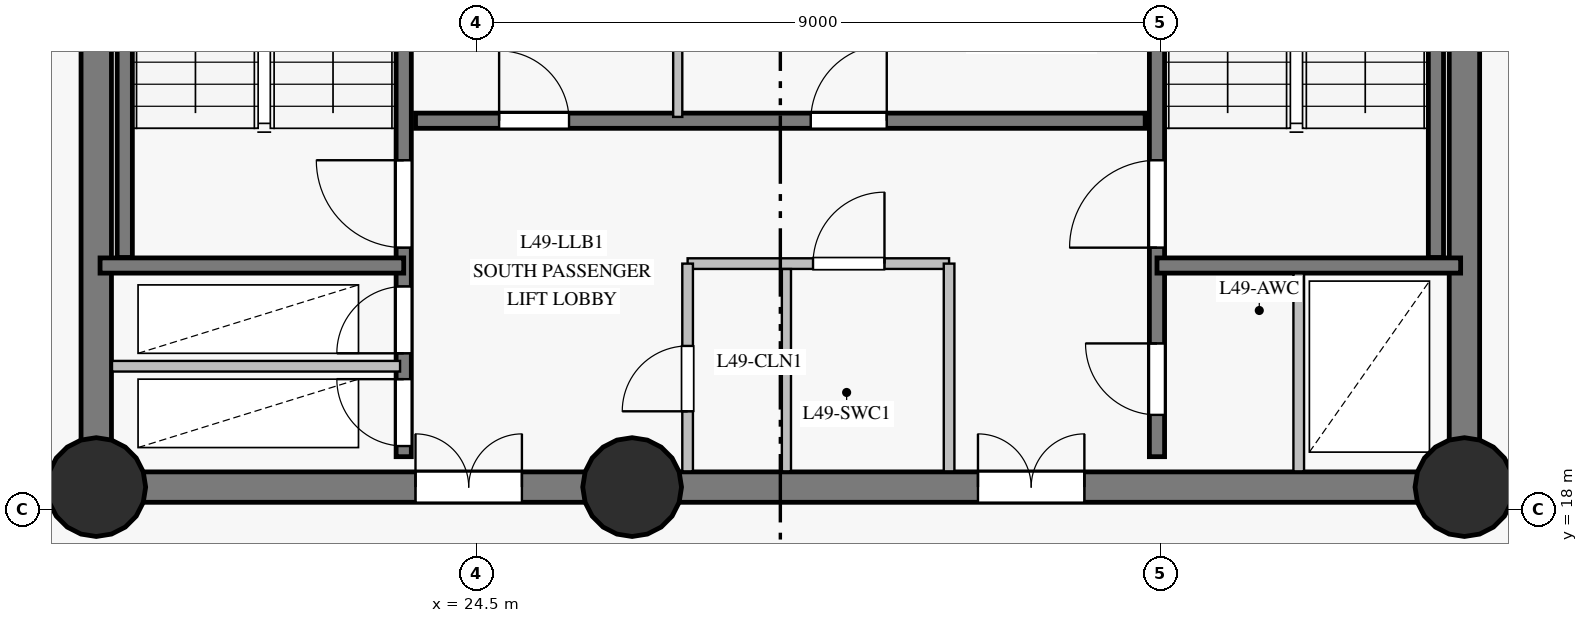
"""IFC4 building model, lengths in metres.
Left out: names, types, materials, properties, quantities, classifications, styles, units other than length and angle.
Written with IfcOpenShell. Run it as: python <this file> out.ifc"""

import sys

from ifc_helpers import new_model, si_unit, direction, frame, frame_2d, origin, origin_with_axes, origin_2d, place, context, subcontext, project, spatial, rectangle, circle, extrude, source, transform, mapped, element, fill, save


model = new_model("IFC4")
c1 = context("Model", 3, precision=1e-05, world=origin(), true_north=direction((0.0, 1.0)))
c2 = subcontext(c1, "Body", "Model", "MODEL_VIEW")
j1 = project(units=[si_unit("LENGTHUNIT", "METRE"), si_unit("PLANEANGLEUNIT", "RADIAN")], contexts=[c1])
p1 = place(None, origin())
s1 = spatial("IfcSite", under=j1, at=p1, CompositionType="ELEMENT")
p2 = place(p1, origin())
s2 = spatial("IfcBuilding", under=s1, at=p2, CompositionType="ELEMENT")
p3 = place(p2, frame((0.0, 0.0, 171.8)))
s3 = spatial("IfcBuildingStorey", under=s2, at=p3, CompositionType="ELEMENT", Elevation=171.8)
p4 = place(p3, frame((19.5, 18.3, 0.0), z_axis=(0.0, 0.0, 1.0), x_axis=(1.0, 0.0, 0.0)))
e1 = element("IfcWall", 1, at=p4, inside=s3, PredefinedType="SHEAR", context=c2, shape_type="SweptSolid", body=[
    extrude(rectangle(XDim=7.05, YDim=0.4, at=frame_2d((3.525, 0.0))), origin(), (0.0, 0.0, 1.0), 2.825),
])
p5 = place(p4, frame((4.2, 0.0, 0.0)))
e2 = element("IfcOpeningElement", 2, at=p5, cuts=e1, PredefinedType="OPENING", context=c2, shape_type="SweptSolid", body=[
    extrude(rectangle(XDim=1.4, YDim=2.2, at=frame_2d((0.7, 1.1))), frame((0.0, 0.21, 0.0), z_axis=(0.0, -1.0, 0.0), x_axis=(1.0, 0.0, 0.0)), (0.0, 0.0, 1.0), 0.42),
])
p6 = place(p3, frame((26.55, 18.3, 0.0), z_axis=(0.0, 0.0, 1.0), x_axis=(1.0, 0.0, 0.0)))
e3 = element("IfcWall", 3, at=p6, inside=s3, PredefinedType="SHEAR", context=c2, shape_type="SweptSolid", body=[
    extrude(rectangle(XDim=10.95, YDim=0.4, at=frame_2d((5.475, 0.0))), origin(), (0.0, 0.0, 1.0), 2.825),
])
p7 = place(p6, frame((4.55, 0.0, 0.0)))
e4 = element("IfcOpeningElement", 4, at=p7, cuts=e3, PredefinedType="OPENING", context=c2, shape_type="SweptSolid", body=[
    extrude(rectangle(XDim=1.4, YDim=2.2, at=frame_2d((0.7, 1.1))), frame((0.0, 0.21, 0.0), z_axis=(0.0, -1.0, 0.0), x_axis=(1.0, 0.0, 0.0)), (0.0, 0.0, 1.0), 0.42),
])
p8 = place(p3, frame((37.5, 18.3, 0.0), z_axis=(0.0, 0.0, 1.0), x_axis=(0.0, 1.0, 0.0)))
e5 = element("IfcWall", 5, at=p8, inside=s3, PredefinedType="SHEAR", context=c2, shape_type="SweptSolid", body=[
    extrude(rectangle(XDim=16.4, YDim=0.4, at=frame_2d((8.2, 0.0))), origin(), (0.0, 0.0, 1.0), 2.825),
])
p9 = place(p8, frame((14.15, 0.0, 0.0)))
e6 = element("IfcOpeningElement", 6, at=p9, cuts=e5, PredefinedType="OPENING", context=c2, shape_type="SweptSolid", body=[
    extrude(rectangle(XDim=1.2, YDim=2.15, at=frame_2d((0.6, 1.075))), frame((0.0, 0.21, 0.0), z_axis=(0.0, -1.0, 0.0), x_axis=(1.0, 0.0, 0.0)), (0.0, 0.0, 1.0), 0.42),
])
p10 = place(p3, frame((19.5, 34.7, 0.0), z_axis=(0.0, 0.0, 1.0), x_axis=(0.0, -1.0, 0.0)))
e7 = element("IfcWall", 7, at=p10, inside=s3, PredefinedType="SHEAR", context=c2, shape_type="SweptSolid", body=[
    extrude(rectangle(XDim=16.4, YDim=0.4, at=frame_2d((8.2, 0.0))), origin(), (0.0, 0.0, 1.0), 2.825),
])
p11 = place(p10, frame((3.1, 0.0, 0.0)))
e8 = element("IfcOpeningElement", 8, at=p11, cuts=e7, PredefinedType="OPENING", context=c2, shape_type="SweptSolid", body=[
    extrude(rectangle(XDim=1.1, YDim=2.15, at=frame_2d((0.55, 1.075))), frame((0.0, 0.21, 0.0), z_axis=(0.0, -1.0, 0.0), x_axis=(1.0, 0.0, 0.0)), (0.0, 0.0, 1.0), 0.42),
])
m1 = source(origin_with_axes(), c2, "Body", "SweptSolid", [
    extrude(circle(Radius=0.65, at=origin_2d()), origin(), (0.0, 0.0, 1.0), 3.05),
])
for number, where, z_axis, x_axis in (
    (9, (19.5, 18.3, 0.0), (0.0, 0.0, 1.0), (1.0, 0.0, 0.0)),
    (10, (26.55, 18.3, 0.0), (0.0, 0.0, 1.0), (1.0, 0.0, 0.0)),
    (11, (37.5, 18.3, 0.0), (0.0, 0.0, 1.0), (1.0, 0.0, 0.0)),
):
    element("IfcColumn", number, at=place(p3, frame(where, z_axis=z_axis, x_axis=x_axis)), inside=s3, PredefinedType="COLUMN", context=c2, shape_type="MappedRepresentation", body=[
        mapped(m1, transform((0.0, 0.0, 0.0), scale=1.0)),
    ])
p12 = place(p3, frame((23.545, 18.7, 0.0), z_axis=(0.0, 0.0, 1.0), x_axis=(0.0, 1.0, 0.0)))
e12 = element("IfcWall", 12, at=p12, inside=s3, PredefinedType="SHEAR", context=c2, shape_type="SweptSolid", body=[
    extrude(rectangle(XDim=15.6, YDim=0.2, at=frame_2d((7.8, 0.0))), origin(), (0.0, 0.0, 1.0), 2.825),
])
p13 = place(p12, frame((2.75, 0.0, 0.0)))
e13 = element("IfcOpeningElement", 13, at=p13, cuts=e12, PredefinedType="OPENING", context=c2, shape_type="SweptSolid", body=[
    extrude(rectangle(XDim=1.15, YDim=2.15, at=frame_2d((0.575, 1.075))), frame((0.0, 0.11, 0.0), z_axis=(0.0, -1.0, 0.0), x_axis=(1.0, 0.0, 0.0)), (0.0, 0.0, 1.0), 0.22),
])
p14 = place(p12, frame((0.14, 0.0, 0.0)))
e14 = element("IfcOpeningElement", 14, at=p14, cuts=e12, PredefinedType="OPENING", context=c2, shape_type="SweptSolid", body=[
    extrude(rectangle(XDim=0.88, YDim=2.1, at=frame_2d((0.44, 1.05))), frame((0.0, 0.11, 0.0), z_axis=(0.0, -1.0, 0.0), x_axis=(1.0, 0.0, 0.0)), (0.0, 0.0, 1.0), 0.22),
])
p15 = place(p12, frame((1.36, 0.0, 0.0)))
e15 = element("IfcOpeningElement", 15, at=p15, cuts=e12, PredefinedType="OPENING", context=c2, shape_type="SweptSolid", body=[
    extrude(rectangle(XDim=0.88, YDim=2.1, at=frame_2d((0.44, 1.05))), frame((0.0, 0.11, 0.0), z_axis=(0.0, -1.0, 0.0), x_axis=(1.0, 0.0, 0.0)), (0.0, 0.0, 1.0), 0.22),
])
p16 = place(p12, frame((12.1, 0.0, 0.0)))
e16 = element("IfcOpeningElement", 16, at=p16, cuts=e12, PredefinedType="OPENING", context=c2, shape_type="SweptSolid", body=[
    extrude(rectangle(XDim=1.12, YDim=2.15, at=frame_2d((0.56, 1.075))), frame((0.0, 0.11, 0.0), z_axis=(0.0, -1.0, 0.0), x_axis=(1.0, 0.0, 0.0)), (0.0, 0.0, 1.0), 0.22),
])
p17 = place(p12, frame((14.05, 0.0, 0.0)))
e17 = element("IfcOpeningElement", 17, at=p17, cuts=e12, PredefinedType="OPENING", context=c2, shape_type="SweptSolid", body=[
    extrude(rectangle(XDim=1.12, YDim=2.15, at=frame_2d((0.56, 1.075))), frame((0.0, 0.11, 0.0), z_axis=(0.0, -1.0, 0.0), x_axis=(1.0, 0.0, 0.0)), (0.0, 0.0, 1.0), 0.22),
])
p18 = place(p3, frame((33.455, 18.7, 0.0), z_axis=(0.0, 0.0, 1.0), x_axis=(0.0, 1.0, 0.0)))
e18 = element("IfcWall", 18, at=p18, inside=s3, PredefinedType="SHEAR", context=c2, shape_type="SweptSolid", body=[
    extrude(rectangle(XDim=15.6, YDim=0.2, at=frame_2d((7.8, 0.0))), origin(), (0.0, 0.0, 1.0), 2.825),
])
p19 = place(p18, frame((2.75, 0.0, 0.0)))
e19 = element("IfcOpeningElement", 19, at=p19, cuts=e18, PredefinedType="OPENING", context=c2, shape_type="SweptSolid", body=[
    extrude(rectangle(XDim=1.15, YDim=2.15, at=frame_2d((0.575, 1.075))), frame((0.0, 0.11, 0.0), z_axis=(0.0, -1.0, 0.0), x_axis=(1.0, 0.0, 0.0)), (0.0, 0.0, 1.0), 0.22),
])
p20 = place(p18, frame((0.55, 0.0, 0.0)))
e20 = element("IfcOpeningElement", 20, at=p20, cuts=e18, PredefinedType="OPENING", context=c2, shape_type="SweptSolid", body=[
    extrude(rectangle(XDim=0.94, YDim=2.1, at=frame_2d((0.47, 1.05))), frame((0.0, 0.11, 0.0), z_axis=(0.0, -1.0, 0.0), x_axis=(1.0, 0.0, 0.0)), (0.0, 0.0, 1.0), 0.22),
])
p21 = place(p3, frame((23.7, 23.12, 0.0), z_axis=(0.0, 0.0, 1.0), x_axis=(1.0, 0.0, 0.0)))
e21 = element("IfcWall", 21, at=p21, inside=s3, PredefinedType="SHEAR", context=c2, shape_type="SweptSolid", body=[
    extrude(rectangle(XDim=9.6, YDim=0.2, at=frame_2d((4.8, 0.0))), origin(), (0.0, 0.0, 1.0), 2.825),
])
p22 = place(p21, frame((1.1, 0.0, 0.0)))
e22 = element("IfcOpeningElement", 22, at=p22, cuts=e21, PredefinedType="OPENING", context=c2, shape_type="SweptSolid", body=[
    extrude(rectangle(XDim=0.92, YDim=2.1, at=frame_2d((0.46, 1.05))), frame((0.0, 0.11, 0.0), z_axis=(0.0, -1.0, 0.0), x_axis=(1.0, 0.0, 0.0)), (0.0, 0.0, 1.0), 0.22),
])
p23 = place(p21, frame((5.2, 0.0, 0.0)))
e23 = element("IfcOpeningElement", 23, at=p23, cuts=e21, PredefinedType="OPENING", context=c2, shape_type="SweptSolid", body=[
    extrude(rectangle(XDim=1.0, YDim=2.15, at=frame_2d((0.5, 1.075))), frame((0.0, 0.11, 0.0), z_axis=(0.0, -1.0, 0.0), x_axis=(1.0, 0.0, 0.0)), (0.0, 0.0, 1.0), 0.22),
])
for number, where, z_axis, x_axis in (
    (24, (19.875, 21.32, 0.0), (0.0, 0.0, 1.0), (0.0, 1.0, 0.0)),
    (25, (37.125, 21.32, 0.0), (0.0, 0.0, 1.0), (0.0, 1.0, 0.0)),
):
    element("IfcWall", number, at=place(p3, frame(where, z_axis=z_axis, x_axis=x_axis)), inside=s3, PredefinedType="SHEAR", context=c2, shape_type="SweptSolid", body=[
        extrude(rectangle(XDim=7.5, YDim=0.2, at=frame_2d((3.75, 0.0))), origin(), (0.0, 0.0, 1.0), 2.825),
    ])
for number, where, z_axis, x_axis in (
    (26, (33.455, 21.215, 0.0), (0.0, 0.0, 1.0), (1.0, 0.0, 0.0)),
    (27, (19.55, 21.215, 0.0), (0.0, 0.0, 1.0), (1.0, 0.0, 0.0)),
):
    element("IfcWall", number, at=place(p3, frame(where, z_axis=z_axis, x_axis=x_axis)), inside=s3, PredefinedType="SHEAR", context=c2, shape_type="SweptSolid", body=[
        extrude(rectangle(XDim=3.995, YDim=0.2, at=frame_2d((1.998, 0.0))), origin(), (0.0, 0.0, 1.0), 2.825),
    ])
p24 = place(p3, frame((19.707, 19.89, 0.0), z_axis=(0.0, 0.0, 1.0), x_axis=(1.0, 0.0, 0.0)))
e28 = element("IfcWall", 28, at=p24, inside=s3, PredefinedType="PARTITIONING", context=c2, shape_type="SweptSolid", body=[
    extrude(rectangle(XDim=3.79, YDim=0.14, at=frame_2d((1.895, 0.0))), origin(), (0.0, 0.0, 1.0), 2.825),
])
p25 = place(p3, frame((27.28, 21.24, 0.0), z_axis=(0.0, 0.0, 1.0), x_axis=(1.0, 0.0, 0.0)))
e29 = element("IfcWall", 29, at=p25, inside=s3, PredefinedType="PARTITIONING", context=c2, shape_type="SweptSolid", body=[
    extrude(rectangle(XDim=3.44, YDim=0.14, at=frame_2d((1.72, 0.0))), origin(), (0.0, 0.0, 1.0), 2.825),
])
p26 = place(p25, frame((1.65, 0.0, 0.0)))
e30 = element("IfcOpeningElement", 30, at=p26, cuts=e29, PredefinedType="OPENING", context=c2, shape_type="SweptSolid", body=[
    extrude(rectangle(XDim=0.94, YDim=2.1, at=frame_2d((0.47, 1.05))), frame((0.0, 0.08, 0.0), z_axis=(0.0, -1.0, 0.0), x_axis=(1.0, 0.0, 0.0)), (0.0, 0.0, 1.0), 0.16),
])
p27 = place(p3, frame((27.15, 23.17, 0.0), z_axis=(0.0, 0.0, 1.0), x_axis=(0.0, 1.0, 0.0)))
e31 = element("IfcWall", 31, at=p27, inside=s3, PredefinedType="PARTITIONING", context=c2, shape_type="SweptSolid", body=[
    extrude(rectangle(XDim=2.7, YDim=0.12, at=frame_2d((1.35, 0.0))), origin(), (0.0, 0.0, 1.0), 2.825),
])
p28 = place(p3, frame((27.28, 18.507, 0.0), z_axis=(0.0, 0.0, 1.0), x_axis=(0.0, 1.0, 0.0)))
e32 = element("IfcWall", 32, at=p28, inside=s3, PredefinedType="PARTITIONING", context=c2, shape_type="SweptSolid", body=[
    extrude(rectangle(XDim=2.733, YDim=0.14, at=frame_2d((1.366, 0.0))), origin(), (0.0, 0.0, 1.0), 2.825),
])
p29 = place(p28, frame((0.79, 0.0, 0.0)))
e33 = element("IfcOpeningElement", 33, at=p29, cuts=e32, PredefinedType="OPENING", context=c2, shape_type="SweptSolid", body=[
    extrude(rectangle(XDim=0.86, YDim=2.1, at=frame_2d((0.43, 1.05))), frame((0.0, 0.08, 0.0), z_axis=(0.0, -1.0, 0.0), x_axis=(1.0, 0.0, 0.0)), (0.0, 0.0, 1.0), 0.16),
])
p30 = place(p3, frame((30.72, 18.507, 0.0), z_axis=(0.0, 0.0, 1.0), x_axis=(0.0, 1.0, 0.0)))
e34 = element("IfcWall", 34, at=p30, inside=s3, PredefinedType="PARTITIONING", context=c2, shape_type="SweptSolid", body=[
    extrude(rectangle(XDim=2.733, YDim=0.14, at=frame_2d((1.366, 0.0))), origin(), (0.0, 0.0, 1.0), 2.825),
])
p31 = place(p3, frame((28.58, 18.507, 0.0), z_axis=(0.0, 0.0, 1.0), x_axis=(0.0, 1.0, 0.0)))
e35 = element("IfcWall", 35, at=p31, inside=s3, PredefinedType="PARTITIONING", context=c2, shape_type="SweptSolid", body=[
    extrude(rectangle(XDim=2.662, YDim=0.12, at=frame_2d((1.331, 0.0))), origin(), (0.0, 0.0, 1.0), 2.825),
])
p32 = place(p3, frame((35.32, 18.507, 0.0), z_axis=(0.0, 0.0, 1.0), x_axis=(0.0, 1.0, 0.0)))
e36 = element("IfcWall", 36, at=p32, inside=s3, PredefinedType="PARTITIONING", context=c2, shape_type="SweptSolid", body=[
    extrude(rectangle(XDim=2.604, YDim=0.14, at=frame_2d((1.302, 0.0))), origin(), (0.0, 0.0, 1.0), 2.825),
])
m2 = source(origin_with_axes(), c2, "Body", "SweptSolid", [
    extrude(rectangle(XDim=1.15, YDim=2.15, at=frame_2d((0.575, 1.075))), frame((0.0, 0.025, 0.0), z_axis=(0.0, -1.0, 0.0), x_axis=(1.0, 0.0, 0.0)), (0.0, 0.0, 1.0), 0.05),
])
p33 = place(p13, origin())
e37 = element("IfcDoor", 37, at=p33, inside=s3, OperationType="SINGLE_SWING_RIGHT", PredefinedType="DOOR", context=c2, shape_type="MappedRepresentation", body=[
    mapped(m2, transform((0.0, 0.0, 0.0), scale=1.0)),
])
fill(e13, e37)
p34 = place(p19, origin())
e38 = element("IfcDoor", 38, at=p34, inside=s3, OperationType="SINGLE_SWING_LEFT", PredefinedType="DOOR", context=c2, shape_type="MappedRepresentation", body=[
    mapped(m2, transform((0.0, 0.0, 0.0), scale=1.0)),
])
fill(e19, e38)
m3 = source(origin_with_axes(), c2, "Body", "SweptSolid", [
    extrude(rectangle(XDim=0.88, YDim=2.1, at=frame_2d((0.44, 1.05))), frame((0.0, 0.025, 0.0), z_axis=(0.0, -1.0, 0.0), x_axis=(1.0, 0.0, 0.0)), (0.0, 0.0, 1.0), 0.05),
])
p35 = place(p14, origin())
e39 = element("IfcDoor", 39, at=p35, inside=s3, OperationType="SINGLE_SWING_RIGHT", PredefinedType="DOOR", context=c2, shape_type="MappedRepresentation", body=[
    mapped(m3, transform((0.0, 0.0, 0.0), scale=1.0)),
])
fill(e14, e39)
p36 = place(p15, origin())
e40 = element("IfcDoor", 40, at=p36, inside=s3, OperationType="SINGLE_SWING_LEFT", PredefinedType="DOOR", context=c2, shape_type="MappedRepresentation", body=[
    mapped(m3, transform((0.0, 0.0, 0.0), scale=1.0)),
])
fill(e15, e40)
m4 = source(origin_with_axes(), c2, "Body", "SweptSolid", [
    extrude(rectangle(XDim=1.4, YDim=2.2, at=frame_2d((0.7, 1.1))), frame((0.0, 0.025, 0.0), z_axis=(0.0, -1.0, 0.0), x_axis=(1.0, 0.0, 0.0)), (0.0, 0.0, 1.0), 0.05),
])
p37 = place(p5, origin())
e41 = element("IfcDoor", 41, at=p37, inside=s3, OperationType="DOUBLE_DOOR_SINGLE_SWING", PredefinedType="DOOR", context=c2, shape_type="MappedRepresentation", body=[
    mapped(m4, transform((0.0, 0.0, 0.0), scale=1.0)),
])
fill(e2, e41)
p38 = place(p7, origin())
e42 = element("IfcDoor", 42, at=p38, inside=s3, OperationType="DOUBLE_DOOR_SINGLE_SWING", PredefinedType="DOOR", context=c2, shape_type="MappedRepresentation", body=[
    mapped(m4, transform((0.0, 0.0, 0.0), scale=1.0)),
])
fill(e4, e42)
m5 = source(origin_with_axes(), c2, "Body", "SweptSolid", [
    extrude(rectangle(XDim=0.94, YDim=2.1, at=frame_2d((0.47, 1.05))), frame((0.0, 0.025, 0.0), z_axis=(0.0, -1.0, 0.0), x_axis=(1.0, 0.0, 0.0)), (0.0, 0.0, 1.0), 0.05),
])
p39 = place(p20, origin())
e43 = element("IfcDoor", 43, at=p39, inside=s3, OperationType="SINGLE_SWING_RIGHT", PredefinedType="DOOR", context=c2, shape_type="MappedRepresentation", body=[
    mapped(m5, transform((0.0, 0.0, 0.0), scale=1.0)),
])
fill(e20, e43)
m6 = source(origin_with_axes(), c2, "Body", "SweptSolid", [
    extrude(rectangle(XDim=0.86, YDim=2.1, at=frame_2d((0.43, 1.05))), frame((0.0, 0.025, 0.0), z_axis=(0.0, -1.0, 0.0), x_axis=(1.0, 0.0, 0.0)), (0.0, 0.0, 1.0), 0.05),
])
p40 = place(p29, origin())
e44 = element("IfcDoor", 44, at=p40, inside=s3, OperationType="SINGLE_SWING_LEFT", PredefinedType="DOOR", context=c2, shape_type="MappedRepresentation", body=[
    mapped(m6, transform((0.0, 0.0, 0.0), scale=1.0)),
])
fill(e33, e44)
p41 = place(p26, origin())
e45 = element("IfcDoor", 45, at=p41, inside=s3, OperationType="SINGLE_SWING_RIGHT", PredefinedType="DOOR", context=c2, shape_type="MappedRepresentation", body=[
    mapped(m5, transform((0.0, 0.0, 0.0), scale=1.0)),
])
fill(e30, e45)
m7 = source(origin_with_axes(), c2, "Body", "SweptSolid", [
    extrude(rectangle(XDim=0.92, YDim=2.1, at=frame_2d((0.46, 1.05))), frame((0.0, 0.025, 0.0), z_axis=(0.0, -1.0, 0.0), x_axis=(1.0, 0.0, 0.0)), (0.0, 0.0, 1.0), 0.05),
])
p42 = place(p22, origin())
e46 = element("IfcDoor", 46, at=p42, inside=s3, OperationType="SINGLE_SWING_LEFT", PredefinedType="DOOR", context=c2, shape_type="MappedRepresentation", body=[
    mapped(m7, transform((0.0, 0.0, 0.0), scale=1.0)),
])
fill(e22, e46)
m8 = source(origin_with_axes(), c2, "Body", "SweptSolid", [
    extrude(rectangle(XDim=1.0, YDim=2.15, at=frame_2d((0.5, 1.075))), frame((0.0, 0.025, 0.0), z_axis=(0.0, -1.0, 0.0), x_axis=(1.0, 0.0, 0.0)), (0.0, 0.0, 1.0), 0.05),
])
p43 = place(p23, origin())
e47 = element("IfcDoor", 47, at=p43, inside=s3, OperationType="SINGLE_SWING_RIGHT", PredefinedType="DOOR", context=c2, shape_type="MappedRepresentation", body=[
    mapped(m8, transform((0.0, 0.0, 0.0), scale=1.0)),
])
fill(e23, e47)
save(model, sys.argv[1])
